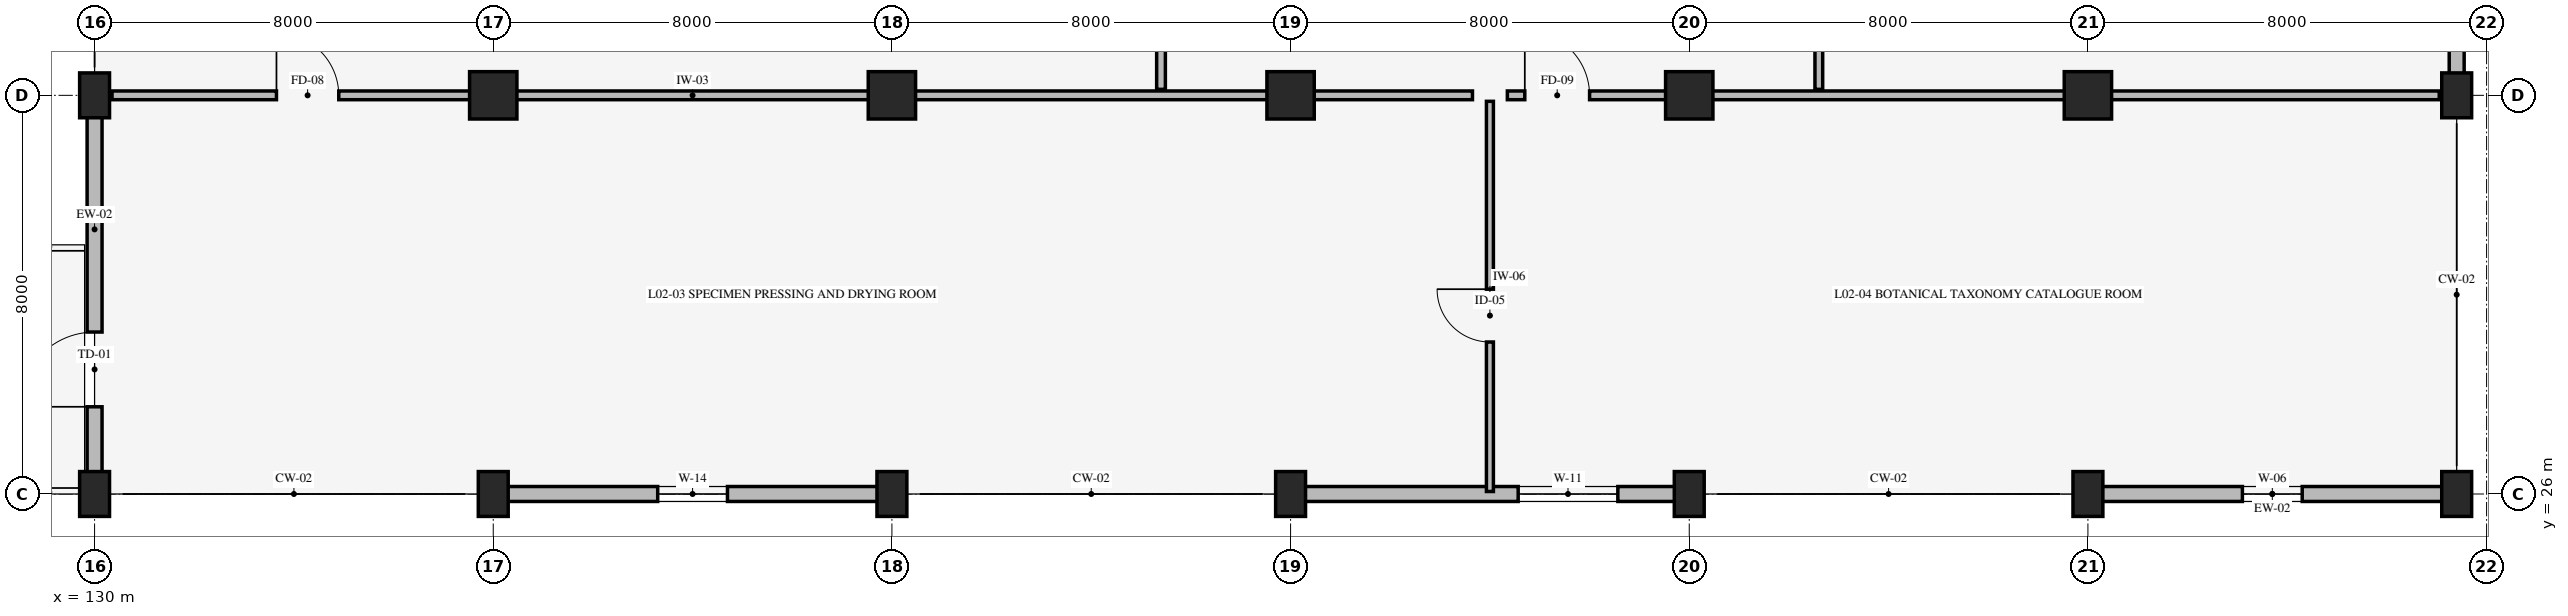
"""IFC4 building model, lengths in metres.
Left out: names, types, materials, properties, quantities, classifications, styles, units other than length and angle.
Written with IfcOpenShell. Run it as: python <this file> out.ifc"""

import sys

from ifc_helpers import new_model, si_unit, direction, frame, frame_2d, origin, origin_2d, place, context, subcontext, project, spatial, rectangle, extrude, element, fill, save


model = new_model("IFC4")
c1 = context("Model", 3, precision=1e-05, world=origin(), true_north=direction((0.0, 1.0)))
c2 = subcontext(c1, "Body", "Model", "MODEL_VIEW")
j1 = project(units=[si_unit("LENGTHUNIT", "METRE"), si_unit("PLANEANGLEUNIT", "RADIAN")], contexts=[c1])
p1 = place(None, origin())
s1 = spatial("IfcSite", under=j1, at=p1, CompositionType="ELEMENT")
p2 = place(p1, origin())
s2 = spatial("IfcBuilding", under=s1, at=p2, CompositionType="ELEMENT")
p3 = place(p2, frame((0.0, 0.0, 5.4)))
s3 = spatial("IfcBuildingStorey", under=s2, at=p3, CompositionType="ELEMENT", Elevation=5.4)
for number, where, z_axis, x_axis in (
    (1, (130.0, 26.0, 0.0), (0.0, 0.0, 1.0), (1.0, 0.0, 0.0)),
    (2, (130.0, 34.0, 0.0), (0.0, 0.0, 1.0), (1.0, 0.0, 0.0)),
    (3, (138.0, 26.0, 0.0), (0.0, 0.0, 1.0), (1.0, 0.0, 0.0)),
):
    element("IfcColumn", number, at=place(p3, frame(where, z_axis=z_axis, x_axis=x_axis)), inside=s3, PredefinedType="COLUMN", context=c2, shape_type="SweptSolid", body=[
        extrude(rectangle(XDim=0.6, YDim=0.9, at=origin_2d()), origin(), (0.0, 0.0, 1.0), 4.8),
    ])
p4 = place(p3, frame((138.0, 34.0, 0.0), z_axis=(0.0, 0.0, 1.0), x_axis=(1.0, 0.0, 0.0)))
e4 = element("IfcColumn", 4, at=p4, inside=s3, PredefinedType="COLUMN", context=c2, shape_type="SweptSolid", body=[
    extrude(rectangle(XDim=0.95, YDim=0.95, at=origin_2d()), origin(), (0.0, 0.0, 1.0), 4.8),
])
p5 = place(p3, frame((146.0, 26.0, 0.0), z_axis=(0.0, 0.0, 1.0), x_axis=(1.0, 0.0, 0.0)))
e5 = element("IfcColumn", 5, at=p5, inside=s3, PredefinedType="COLUMN", context=c2, shape_type="SweptSolid", body=[
    extrude(rectangle(XDim=0.6, YDim=0.9, at=origin_2d()), origin(), (0.0, 0.0, 1.0), 4.8),
])
p6 = place(p3, frame((146.0, 34.0, 0.0), z_axis=(0.0, 0.0, 1.0), x_axis=(1.0, 0.0, 0.0)))
e6 = element("IfcColumn", 6, at=p6, inside=s3, PredefinedType="COLUMN", context=c2, shape_type="SweptSolid", body=[
    extrude(rectangle(XDim=0.95, YDim=0.95, at=origin_2d()), origin(), (0.0, 0.0, 1.0), 4.8),
])
p7 = place(p3, frame((154.0, 26.0, 0.0), z_axis=(0.0, 0.0, 1.0), x_axis=(1.0, 0.0, 0.0)))
e7 = element("IfcColumn", 7, at=p7, inside=s3, PredefinedType="COLUMN", context=c2, shape_type="SweptSolid", body=[
    extrude(rectangle(XDim=0.6, YDim=0.9, at=origin_2d()), origin(), (0.0, 0.0, 1.0), 4.8),
])
p8 = place(p3, frame((154.0, 34.0, 0.0), z_axis=(0.0, 0.0, 1.0), x_axis=(1.0, 0.0, 0.0)))
e8 = element("IfcColumn", 8, at=p8, inside=s3, PredefinedType="COLUMN", context=c2, shape_type="SweptSolid", body=[
    extrude(rectangle(XDim=0.95, YDim=0.95, at=origin_2d()), origin(), (0.0, 0.0, 1.0), 4.8),
])
p9 = place(p3, frame((162.0, 26.0, 0.0), z_axis=(0.0, 0.0, 1.0), x_axis=(1.0, 0.0, 0.0)))
e9 = element("IfcColumn", 9, at=p9, inside=s3, PredefinedType="COLUMN", context=c2, shape_type="SweptSolid", body=[
    extrude(rectangle(XDim=0.6, YDim=0.9, at=origin_2d()), origin(), (0.0, 0.0, 1.0), 4.8),
])
p10 = place(p3, frame((162.0, 34.0, 0.0), z_axis=(0.0, 0.0, 1.0), x_axis=(1.0, 0.0, 0.0)))
e10 = element("IfcColumn", 10, at=p10, inside=s3, PredefinedType="COLUMN", context=c2, shape_type="SweptSolid", body=[
    extrude(rectangle(XDim=0.95, YDim=0.95, at=origin_2d()), origin(), (0.0, 0.0, 1.0), 4.8),
])
p11 = place(p3, frame((170.0, 26.0, 0.0), z_axis=(0.0, 0.0, 1.0), x_axis=(1.0, 0.0, 0.0)))
e11 = element("IfcColumn", 11, at=p11, inside=s3, PredefinedType="COLUMN", context=c2, shape_type="SweptSolid", body=[
    extrude(rectangle(XDim=0.6, YDim=0.9, at=origin_2d()), origin(), (0.0, 0.0, 1.0), 4.8),
])
p12 = place(p3, frame((170.0, 34.0, 0.0), z_axis=(0.0, 0.0, 1.0), x_axis=(1.0, 0.0, 0.0)))
e12 = element("IfcColumn", 12, at=p12, inside=s3, PredefinedType="COLUMN", context=c2, shape_type="SweptSolid", body=[
    extrude(rectangle(XDim=0.95, YDim=0.95, at=origin_2d()), origin(), (0.0, 0.0, 1.0), 4.8),
])
for number, where, z_axis, x_axis in (
    (13, (177.4, 26.0, 0.0), (0.0, 0.0, 1.0), (1.0, 0.0, 0.0)),
    (14, (177.4, 34.0, 0.0), (0.0, 0.0, 1.0), (1.0, 0.0, 0.0)),
):
    element("IfcColumn", number, at=place(p3, frame(where, z_axis=z_axis, x_axis=x_axis)), inside=s3, PredefinedType="COLUMN", context=c2, shape_type="SweptSolid", body=[
        extrude(rectangle(XDim=0.6, YDim=0.9, at=origin_2d()), origin(), (0.0, 0.0, 1.0), 4.8),
    ])
p13 = place(p3, frame((177.4, 26.0, 0.0), z_axis=(0.0, 0.0, 1.0), x_axis=(-1.0, 0.0, 0.0)))
e15 = element("IfcWall", 15, at=p13, inside=s3, PredefinedType="STANDARD", context=c2, shape_type="SweptSolid", body=[
    extrude(rectangle(XDim=7.4, YDim=0.3, at=frame_2d((3.7, 0.0))), origin(), (0.0, 0.0, 1.0), 3.6),
])
p14 = place(p13, frame((3.1, 0.0, 0.85)))
e16 = element("IfcOpeningElement", 16, at=p14, cuts=e15, PredefinedType="OPENING", context=c2, shape_type="SweptSolid", body=[
    extrude(rectangle(XDim=1.2, YDim=1.2, at=frame_2d((0.6, 0.6))), frame((0.0, 0.16, 0.0), z_axis=(0.0, -1.0, 0.0), x_axis=(1.0, 0.0, 0.0)), (0.0, 0.0, 1.0), 0.32),
])
p15 = place(p3, frame((162.0, 26.0, 0.0), z_axis=(0.0, 0.0, 1.0), x_axis=(-1.0, 0.0, 0.0)))
e17 = element("IfcWall", 17, at=p15, inside=s3, PredefinedType="STANDARD", context=c2, shape_type="SweptSolid", body=[
    extrude(rectangle(XDim=8.0, YDim=0.3, at=frame_2d((4.0, 0.0))), origin(), (0.0, 0.0, 1.0), 3.6),
])
p16 = place(p15, frame((1.433, 0.0, 0.85)))
e18 = element("IfcOpeningElement", 18, at=p16, cuts=e17, PredefinedType="OPENING", context=c2, shape_type="SweptSolid", body=[
    extrude(rectangle(XDim=2.0, YDim=1.5, at=frame_2d((1.0, 0.75))), frame((0.0, 0.16, 0.0), z_axis=(0.0, -1.0, 0.0), x_axis=(1.0, 0.0, 0.0)), (0.0, 0.0, 1.0), 0.32),
])
p17 = place(p3, frame((146.0, 26.0, 0.0), z_axis=(0.0, 0.0, 1.0), x_axis=(-1.0, 0.0, 0.0)))
e19 = element("IfcWall", 19, at=p17, inside=s3, PredefinedType="STANDARD", context=c2, shape_type="SweptSolid", body=[
    extrude(rectangle(XDim=8.0, YDim=0.3, at=frame_2d((4.0, 0.0))), origin(), (0.0, 0.0, 1.0), 3.6),
])
p18 = place(p17, frame((3.3, 0.0, 0.85)))
e20 = element("IfcOpeningElement", 20, at=p18, cuts=e19, PredefinedType="OPENING", context=c2, shape_type="SweptSolid", body=[
    extrude(rectangle(XDim=1.4, YDim=1.9, at=frame_2d((0.7, 0.95))), frame((0.0, 0.16, 0.0), z_axis=(0.0, -1.0, 0.0), x_axis=(1.0, 0.0, 0.0)), (0.0, 0.0, 1.0), 0.32),
])
p19 = place(p3, frame((130.0, 26.0, 0.0), z_axis=(0.0, 0.0, 1.0), x_axis=(0.0, 1.0, 0.0)))
e21 = element("IfcWall", 21, at=p19, inside=s3, PredefinedType="STANDARD", context=c2, shape_type="SweptSolid", body=[
    extrude(rectangle(XDim=8.0, YDim=0.3, at=frame_2d((4.0, 0.0))), origin(), (0.0, 0.0, 1.0), 3.55),
])
p20 = place(p19, frame((1.75, 0.0, 0.0)))
e22 = element("IfcOpeningElement", 22, at=p20, cuts=e21, PredefinedType="OPENING", context=c2, shape_type="SweptSolid", body=[
    extrude(rectangle(XDim=1.5, YDim=2.25, at=frame_2d((0.75, 1.125))), frame((0.0, 0.16, 0.0), z_axis=(0.0, -1.0, 0.0), x_axis=(1.0, 0.0, 0.0)), (0.0, 0.0, 1.0), 0.32),
])
p21 = place(p3, frame((177.4, 42.0, 0.0), z_axis=(0.0, 0.0, 1.0), x_axis=(0.0, -1.0, 0.0)))
e23 = element("IfcWall", 23, at=p21, inside=s3, PredefinedType="STANDARD", context=c2, shape_type="SweptSolid", body=[
    extrude(rectangle(XDim=8.0, YDim=0.3, at=frame_2d((4.0, 0.0))), origin(), (0.0, 0.0, 1.0), 3.55),
])
p22 = place(p21, frame((3.15, 0.0, 0.85)))
e24 = element("IfcOpeningElement", 24, at=p22, cuts=e23, PredefinedType="OPENING", context=c2, shape_type="SweptSolid", body=[
    extrude(rectangle(XDim=1.7, YDim=1.2, at=frame_2d((0.85, 0.6))), frame((0.0, 0.16, 0.0), z_axis=(0.0, -1.0, 0.0), x_axis=(1.0, 0.0, 0.0)), (0.0, 0.0, 1.0), 0.32),
])
p23 = place(p3, frame((151.4, 34.12, 0.0), z_axis=(0.0, 0.0, 1.0), x_axis=(0.0, 1.0, 0.0)))
e25 = element("IfcWall", 25, at=p23, inside=s3, PredefinedType="STANDARD", context=c2, shape_type="SweptSolid", body=[
    extrude(rectangle(XDim=19.76, YDim=0.175, at=frame_2d((9.88, 0.0))), origin(), (0.0, 0.0, 1.0), 4.5),
])
p24 = place(p23, frame((9.355, 0.0, 0.0)))
e26 = element("IfcOpeningElement", 26, at=p24, cuts=e25, PredefinedType="OPENING", context=c2, shape_type="SweptSolid", body=[
    extrude(rectangle(XDim=1.05, YDim=2.1, at=frame_2d((0.525, 1.05))), frame((0.0, 0.098, 0.0), z_axis=(0.0, -1.0, 0.0), x_axis=(1.0, 0.0, 0.0)), (0.0, 0.0, 1.0), 0.195),
])
p25 = place(p3, frame((164.6, 34.12, 0.0), z_axis=(0.0, 0.0, 1.0), x_axis=(0.0, 1.0, 0.0)))
e27 = element("IfcWall", 27, at=p25, inside=s3, PredefinedType="STANDARD", context=c2, shape_type="SweptSolid", body=[
    extrude(rectangle(XDim=15.8, YDim=0.155, at=frame_2d((7.9, 0.0))), origin(), (0.0, 0.0, 1.0), 4.5),
])
p26 = place(p25, frame((7.325, 0.0, 0.0)))
e28 = element("IfcOpeningElement", 28, at=p26, cuts=e27, PredefinedType="OPENING", context=c2, shape_type="SweptSolid", body=[
    extrude(rectangle(XDim=1.15, YDim=2.1, at=frame_2d((0.575, 1.05))), frame((0.0, 0.087, 0.0), z_axis=(0.0, -1.0, 0.0), x_axis=(1.0, 0.0, 0.0)), (0.0, 0.0, 1.0), 0.175),
])
p27 = place(p3, frame((130.35, 34.0, 0.0), z_axis=(0.0, 0.0, 1.0), x_axis=(1.0, 0.0, 0.0)))
e29 = element("IfcWall", 29, at=p27, inside=s3, PredefinedType="STANDARD", context=c2, shape_type="SweptSolid", body=[
    extrude(rectangle(XDim=27.3, YDim=0.175, at=frame_2d((13.65, 0.0))), origin(), (0.0, 0.0, 1.0), 3.6),
])
p28 = place(p27, frame((3.3, 0.0, 0.0)))
e30 = element("IfcOpeningElement", 30, at=p28, cuts=e29, PredefinedType="OPENING", context=c2, shape_type="SweptSolid", body=[
    extrude(rectangle(XDim=1.25, YDim=2.15, at=frame_2d((0.625, 1.075))), frame((0.0, 0.098, 0.0), z_axis=(0.0, -1.0, 0.0), x_axis=(1.0, 0.0, 0.0)), (0.0, 0.0, 1.0), 0.195),
])
p29 = place(p3, frame((158.0, 26.05, 0.0), z_axis=(0.0, 0.0, 1.0), x_axis=(0.0, 1.0, 0.0)))
e31 = element("IfcWall", 31, at=p29, inside=s3, PredefinedType="STANDARD", context=c2, shape_type="SweptSolid", body=[
    extrude(rectangle(XDim=7.83, YDim=0.14, at=frame_2d((3.915, 0.0))), origin(), (0.0, 0.0, 1.0), 4.0),
])
p30 = place(p29, frame((3.0, 0.0, 0.0)))
e32 = element("IfcOpeningElement", 32, at=p30, cuts=e31, PredefinedType="OPENING", context=c2, shape_type="SweptSolid", body=[
    extrude(rectangle(XDim=1.06, YDim=2.12, at=frame_2d((0.53, 1.06))), frame((0.0, 0.08, 0.0), z_axis=(0.0, -1.0, 0.0), x_axis=(1.0, 0.0, 0.0)), (0.0, 0.0, 1.0), 0.16),
])
p31 = place(p3, frame((158.35, 34.0, 0.0), z_axis=(0.0, 0.0, 1.0), x_axis=(1.0, 0.0, 0.0)))
e33 = element("IfcWall", 33, at=p31, inside=s3, PredefinedType="STANDARD", context=c2, shape_type="SweptSolid", body=[
    extrude(rectangle(XDim=18.7, YDim=0.175, at=frame_2d((9.35, 0.0))), origin(), (0.0, 0.0, 1.0), 3.6),
])
p32 = place(p31, frame((0.35, 0.0, 0.0)))
e34 = element("IfcOpeningElement", 34, at=p32, cuts=e33, PredefinedType="OPENING", context=c2, shape_type="SweptSolid", body=[
    extrude(rectangle(XDim=1.3, YDim=2.15, at=frame_2d((0.65, 1.075))), frame((0.0, 0.098, 0.0), z_axis=(0.0, -1.0, 0.0), x_axis=(1.0, 0.0, 0.0)), (0.0, 0.0, 1.0), 0.195),
])
p33 = place(p14, origin())
e35 = element("IfcWindow", 35, at=p33, inside=s3, PartitioningType="SINGLE_PANEL", PredefinedType="WINDOW", context=c2, shape_type="SweptSolid", body=[
    extrude(rectangle(XDim=1.2, YDim=1.2, at=frame_2d((0.6, 0.6))), frame((0.0, 0.03, 0.0), z_axis=(0.0, -1.0, 0.0), x_axis=(1.0, 0.0, 0.0)), (0.0, 0.0, 1.0), 0.06),
])
fill(e16, e35)
p34 = place(p16, origin())
e36 = element("IfcWindow", 36, at=p34, inside=s3, PartitioningType="SINGLE_PANEL", PredefinedType="WINDOW", context=c2, shape_type="SweptSolid", body=[
    extrude(rectangle(XDim=2.0, YDim=1.5, at=frame_2d((1.0, 0.75))), frame((0.0, 0.03, 0.0), z_axis=(0.0, -1.0, 0.0), x_axis=(1.0, 0.0, 0.0)), (0.0, 0.0, 1.0), 0.06),
])
fill(e18, e36)
p35 = place(p18, origin())
e37 = element("IfcWindow", 37, at=p35, inside=s3, PartitioningType="SINGLE_PANEL", PredefinedType="WINDOW", context=c2, shape_type="SweptSolid", body=[
    extrude(rectangle(XDim=1.4, YDim=1.9, at=frame_2d((0.7, 0.95))), frame((0.0, 0.03, 0.0), z_axis=(0.0, -1.0, 0.0), x_axis=(1.0, 0.0, 0.0)), (0.0, 0.0, 1.0), 0.06),
])
fill(e20, e37)
p36 = place(p20, origin())
e38 = element("IfcDoor", 38, at=p36, inside=s3, OperationType="SINGLE_SWING_LEFT", PredefinedType="DOOR", context=c2, shape_type="SweptSolid", body=[
    extrude(rectangle(XDim=1.5, YDim=2.25, at=frame_2d((0.75, 1.125))), frame((0.0, 0.025, 0.0), z_axis=(0.0, -1.0, 0.0), x_axis=(1.0, 0.0, 0.0)), (0.0, 0.0, 1.0), 0.05),
])
fill(e22, e38)
p37 = place(p28, origin())
e39 = element("IfcDoor", 39, at=p37, inside=s3, OperationType="SINGLE_SWING_LEFT", PredefinedType="DOOR", context=c2, shape_type="SweptSolid", body=[
    extrude(rectangle(XDim=1.25, YDim=2.15, at=frame_2d((0.625, 1.075))), frame((0.0, 0.025, 0.0), z_axis=(0.0, -1.0, 0.0), x_axis=(1.0, 0.0, 0.0)), (0.0, 0.0, 1.0), 0.05),
])
fill(e30, e39)
p38 = place(p30, origin())
e40 = element("IfcDoor", 40, at=p38, inside=s3, OperationType="SINGLE_SWING_RIGHT", PredefinedType="DOOR", context=c2, shape_type="SweptSolid", body=[
    extrude(rectangle(XDim=1.06, YDim=2.12, at=frame_2d((0.53, 1.06))), frame((0.0, 0.025, 0.0), z_axis=(0.0, -1.0, 0.0), x_axis=(1.0, 0.0, 0.0)), (0.0, 0.0, 1.0), 0.05),
])
fill(e32, e40)
p39 = place(p32, origin())
e41 = element("IfcDoor", 41, at=p39, inside=s3, OperationType="SINGLE_SWING_LEFT", PredefinedType="DOOR", context=c2, shape_type="SweptSolid", body=[
    extrude(rectangle(XDim=1.3, YDim=2.15, at=frame_2d((0.65, 1.075))), frame((0.0, 0.025, 0.0), z_axis=(0.0, -1.0, 0.0), x_axis=(1.0, 0.0, 0.0)), (0.0, 0.0, 1.0), 0.05),
])
fill(e34, e41)
save(model, sys.argv[1])
